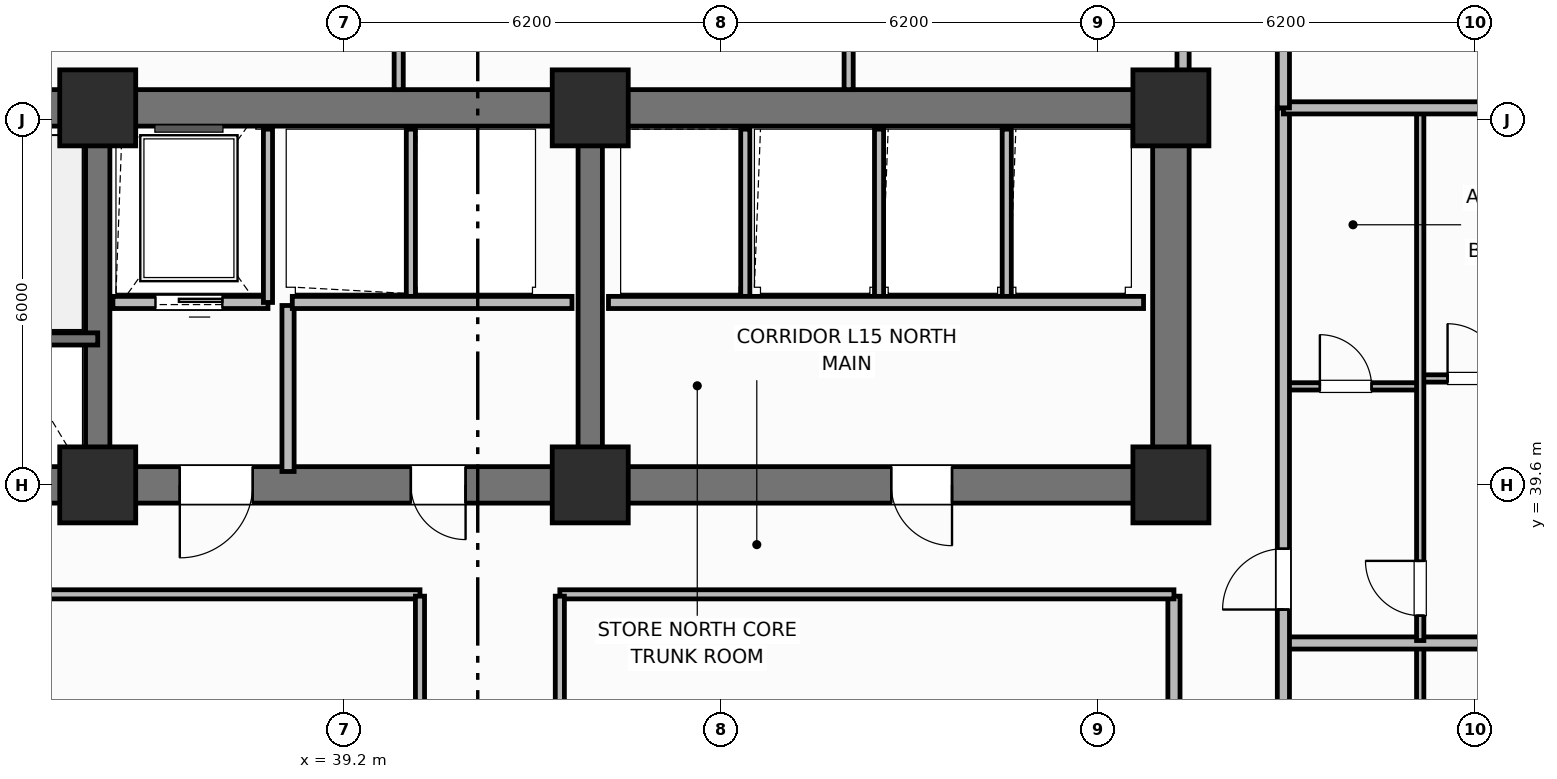
"""IFC4 building model, lengths in metres.
Left out: names, types, materials, properties, quantities, classifications, styles, units other than length and angle.
Written with IfcOpenShell. Run it as: python <this file> out.ifc"""

import sys

from ifc_helpers import new_model, si_unit, direction, frame, frame_2d, origin, origin_2d, place, context, subcontext, project, spatial, rectangle, extrude, element, fill, save


model = new_model("IFC4")
c1 = context("Model", 3, precision=1e-05, world=origin(), true_north=direction((0.0, 1.0)))
c2 = subcontext(c1, "Body", "Model", "MODEL_VIEW")
j1 = project(units=[si_unit("LENGTHUNIT", "METRE"), si_unit("PLANEANGLEUNIT", "RADIAN")], contexts=[c1])
p1 = place(None, origin())
s1 = spatial("IfcSite", under=j1, at=p1, CompositionType="ELEMENT")
p2 = place(p1, origin())
s2 = spatial("IfcBuilding", under=s1, at=p2, CompositionType="ELEMENT")
p3 = place(p2, frame((0.0, 0.0, 62.1)))
s3 = spatial("IfcBuildingStorey", under=s2, at=p3, CompositionType="ELEMENT", Elevation=62.1)
p4 = place(p3, frame((25.6, 45.8, 0.0), z_axis=(0.0, 0.0, 1.0), x_axis=(1.0, 0.0, 0.0)))
e1 = element("IfcWall", 1, at=p4, inside=s3, PredefinedType="SHEAR", context=c2, shape_type="SweptSolid", body=[
    extrude(rectangle(XDim=27.2, YDim=0.6, at=frame_2d((13.6, 0.0))), origin(), (0.0, 0.0, 1.0), 3.7),
])
p5 = place(p3, frame((52.8, 39.9, 0.0), z_axis=(0.0, 0.0, 1.0), x_axis=(0.0, 1.0, 0.0)))
e2 = element("IfcWall", 2, at=p5, inside=s3, PredefinedType="SHEAR", context=c2, shape_type="SweptSolid", body=[
    extrude(rectangle(XDim=5.6, YDim=0.6, at=frame_2d((2.8, 0.0))), origin(), (0.0, 0.0, 1.0), 3.7),
])
p6 = place(p3, frame((52.8, 39.6, 0.0), z_axis=(0.0, 0.0, 1.0), x_axis=(-1.0, 0.0, 0.0)))
e3 = element("IfcWall", 3, at=p6, inside=s3, PredefinedType="SHEAR", context=c2, shape_type="SweptSolid", body=[
    extrude(rectangle(XDim=27.2, YDim=0.6, at=frame_2d((13.6, 0.0))), origin(), (0.0, 0.0, 1.0), 3.7),
])
p7 = place(p6, frame((24.2, 0.0, 0.0)))
e4 = element("IfcOpeningElement", 4, at=p7, cuts=e3, PredefinedType="OPENING", context=c2, shape_type="SweptSolid", body=[
    extrude(rectangle(XDim=1.1, YDim=2.15, at=frame_2d((0.55, 1.075))), frame((0.0, 0.31, 0.0), z_axis=(0.0, -1.0, 0.0), x_axis=(1.0, 0.0, 0.0)), (0.0, 0.0, 1.0), 0.62),
])
p8 = place(p6, frame((15.1, 0.0, 0.0)))
e5 = element("IfcOpeningElement", 5, at=p8, cuts=e3, PredefinedType="OPENING", context=c2, shape_type="SweptSolid", body=[
    extrude(rectangle(XDim=1.2, YDim=2.15, at=frame_2d((0.6, 1.075))), frame((0.0, 0.31, 0.0), z_axis=(0.0, -1.0, 0.0), x_axis=(1.0, 0.0, 0.0)), (0.0, 0.0, 1.0), 0.62),
])
p9 = place(p6, frame((11.6, 0.0, 0.0)))
e6 = element("IfcOpeningElement", 6, at=p9, cuts=e3, PredefinedType="OPENING", context=c2, shape_type="SweptSolid", body=[
    extrude(rectangle(XDim=0.9, YDim=2.1, at=frame_2d((0.45, 1.05))), frame((0.0, 0.31, 0.0), z_axis=(0.0, -1.0, 0.0), x_axis=(1.0, 0.0, 0.0)), (0.0, 0.0, 1.0), 0.62),
])
p10 = place(p6, frame((3.6, 0.0, 0.0)))
e7 = element("IfcOpeningElement", 7, at=p10, cuts=e3, PredefinedType="OPENING", context=c2, shape_type="SweptSolid", body=[
    extrude(rectangle(XDim=1.0, YDim=2.15, at=frame_2d((0.5, 1.075))), frame((0.0, 0.31, 0.0), z_axis=(0.0, -1.0, 0.0), x_axis=(1.0, 0.0, 0.0)), (0.0, 0.0, 1.0), 0.62),
])
for number, where, z_axis, x_axis in (
    (8, (35.15, 39.9, 0.0), (0.0, 0.0, 1.0), (0.0, 1.0, 0.0)),
    (9, (43.25, 39.9, 0.0), (0.0, 0.0, 1.0), (0.0, 1.0, 0.0)),
):
    element("IfcWall", number, at=place(p3, frame(where, z_axis=z_axis, x_axis=x_axis)), inside=s3, PredefinedType="SHEAR", context=c2, shape_type="SweptSolid", body=[
        extrude(rectangle(XDim=5.6, YDim=0.4, at=frame_2d((2.8, 0.0))), origin(), (0.0, 0.0, 1.0), 3.7),
    ])
for number, where, z_axis, x_axis in (
    (10, (35.15, 39.6, 0.0), (0.0, 0.0, 1.0), (1.0, 0.0, 0.0)),
    (11, (35.15, 45.8, 0.0), (0.0, 0.0, 1.0), (1.0, 0.0, 0.0)),
    (12, (43.25, 39.6, 0.0), (0.0, 0.0, 1.0), (1.0, 0.0, 0.0)),
    (13, (43.25, 45.8, 0.0), (0.0, 0.0, 1.0), (1.0, 0.0, 0.0)),
    (14, (52.8, 39.6, 0.0), (0.0, 0.0, 1.0), (1.0, 0.0, 0.0)),
    (15, (52.8, 45.8, 0.0), (0.0, 0.0, 1.0), (1.0, 0.0, 0.0)),
):
    element("IfcColumn", number, at=place(p3, frame(where, z_axis=z_axis, x_axis=x_axis)), inside=s3, PredefinedType="COLUMN", context=c2, shape_type="SweptSolid", body=[
        extrude(rectangle(XDim=1.25, YDim=1.25, at=origin_2d()), origin(), (0.0, 0.0, 1.0), 3.7),
    ])
p11 = place(p3, frame((35.15, 42.0, 0.0), z_axis=(0.0, 0.0, 1.0), x_axis=(-1.0, 0.0, 0.0)))
e16 = element("IfcWall", 16, at=p11, inside=s3, PredefinedType="SHEAR", context=c2, shape_type="SweptSolid", body=[
    extrude(rectangle(XDim=9.55, YDim=0.2, at=frame_2d((4.775, 0.0))), origin(), (0.0, 0.0, 1.0), 3.7),
])
p12 = place(p11, frame((7.25, 0.0, 0.0)))
e17 = element("IfcOpeningElement", 17, at=p12, cuts=e16, PredefinedType="OPENING", context=c2, shape_type="SweptSolid", body=[
    extrude(rectangle(XDim=1.1, YDim=2.15, at=frame_2d((0.55, 1.075))), frame((0.0, 0.11, 0.0), z_axis=(0.0, -1.0, 0.0), x_axis=(1.0, 0.0, 0.0)), (0.0, 0.0, 1.0), 0.22),
])
p13 = place(p3, frame((37.95, 42.6, 0.0), z_axis=(0.0, 0.0, 1.0), x_axis=(-1.0, 0.0, 0.0)))
e18 = element("IfcWall", 18, at=p13, inside=s3, PredefinedType="PARTITIONING", context=c2, shape_type="SweptSolid", body=[
    extrude(rectangle(XDim=2.55, YDim=0.2, at=frame_2d((1.275, 0.0))), origin(), (0.0, 0.0, 1.0), 2.3),
])
p14 = place(p13, frame((0.75, 0.0, 0.0)))
e19 = element("IfcOpeningElement", 19, at=p14, cuts=e18, PredefinedType="OPENING", context=c2, shape_type="SweptSolid", body=[
    extrude(rectangle(XDim=1.1, YDim=2.15, at=frame_2d((0.55, 1.075))), frame((0.0, 0.11, 0.0), z_axis=(0.0, -1.0, 0.0), x_axis=(1.0, 0.0, 0.0)), (0.0, 0.0, 1.0), 0.22),
])
p15 = place(p3, frame((37.95, 42.6, 0.0), z_axis=(0.0, 0.0, 1.0), x_axis=(0.0, 1.0, 0.0)))
e20 = element("IfcWall", 20, at=p15, inside=s3, PredefinedType="PARTITIONING", context=c2, shape_type="SweptSolid", body=[
    extrude(rectangle(XDim=2.85, YDim=0.15, at=frame_2d((1.425, 0.0))), origin(), (0.0, 0.0, 1.0), 2.53),
])
p16 = place(p3, frame((38.28, 39.82, 0.0), z_axis=(0.0, 0.0, 1.0), x_axis=(0.0, 1.0, 0.0)))
e21 = element("IfcWall", 21, at=p16, inside=s3, PredefinedType="PARTITIONING", context=c2, shape_type="SweptSolid", body=[
    extrude(rectangle(XDim=2.73, YDim=0.2, at=frame_2d((1.365, 0.0))), origin(), (0.0, 0.0, 1.0), 2.53),
])
p17 = place(p3, frame((40.3, 42.65, 0.0), z_axis=(0.0, 0.0, 1.0), x_axis=(0.0, 1.0, 0.0)))
e22 = element("IfcWall", 22, at=p17, inside=s3, PredefinedType="PARTITIONING", context=c2, shape_type="SweptSolid", body=[
    extrude(rectangle(XDim=2.8, YDim=0.15, at=frame_2d((1.4, 0.0))), origin(), (0.0, 0.0, 1.0), 2.53),
])
p18 = place(p3, frame((42.95, 42.6, 0.0), z_axis=(0.0, 0.0, 1.0), x_axis=(-1.0, 0.0, 0.0)))
e23 = element("IfcWall", 23, at=p18, inside=s3, PredefinedType="PARTITIONING", context=c2, shape_type="SweptSolid", body=[
    extrude(rectangle(XDim=4.6, YDim=0.2, at=frame_2d((2.3, 0.0))), origin(), (0.0, 0.0, 1.0), 2.3),
])
for number, where, z_axis, x_axis in (
    (24, (45.8, 42.65, 0.0), (0.0, 0.0, 1.0), (0.0, 1.0, 0.0)),
    (25, (48.0, 42.65, 0.0), (0.0, 0.0, 1.0), (0.0, 1.0, 0.0)),
    (26, (50.1, 42.65, 0.0), (0.0, 0.0, 1.0), (0.0, 1.0, 0.0)),
):
    element("IfcWall", number, at=place(p3, frame(where, z_axis=z_axis, x_axis=x_axis)), inside=s3, PredefinedType="PARTITIONING", context=c2, shape_type="SweptSolid", body=[
        extrude(rectangle(XDim=2.8, YDim=0.15, at=frame_2d((1.4, 0.0))), origin(), (0.0, 0.0, 1.0), 2.53),
    ])
p19 = place(p3, frame((52.35, 42.6, 0.0), z_axis=(0.0, 0.0, 1.0), x_axis=(-1.0, 0.0, 0.0)))
e27 = element("IfcWall", 27, at=p19, inside=s3, PredefinedType="PARTITIONING", context=c2, shape_type="SweptSolid", body=[
    extrude(rectangle(XDim=8.8, YDim=0.2, at=frame_2d((4.4, 0.0))), origin(), (0.0, 0.0, 1.0), 2.53),
])
p20 = place(p3, frame((52.85, 18.63, 0.0), z_axis=(0.0, 0.0, 1.0), x_axis=(0.0, 1.0, 0.0)))
e28 = element("IfcWall", 28, at=p20, inside=s3, PredefinedType="PARTITIONING", context=c2, shape_type="SweptSolid", body=[
    extrude(rectangle(XDim=19.14, YDim=0.2, at=frame_2d((9.57, 0.0))), origin(), (0.0, 0.0, 1.0), 2.53),
])
p21 = place(p3, frame((25.55, 37.8, 0.0), z_axis=(0.0, 0.0, 1.0), x_axis=(1.0, 0.0, 0.0)))
e29 = element("IfcWall", 29, at=p21, inside=s3, PredefinedType="PARTITIONING", context=c2, shape_type="SweptSolid", body=[
    extrude(rectangle(XDim=14.9, YDim=0.15, at=frame_2d((7.45, 0.0))), origin(), (0.0, 0.0, 1.0), 2.53),
])
p22 = place(p3, frame((42.75, 37.8, 0.0), z_axis=(0.0, 0.0, 1.0), x_axis=(1.0, 0.0, 0.0)))
e30 = element("IfcWall", 30, at=p22, inside=s3, PredefinedType="PARTITIONING", context=c2, shape_type="SweptSolid", body=[
    extrude(rectangle(XDim=10.1, YDim=0.15, at=frame_2d((5.05, 0.0))), origin(), (0.0, 0.0, 1.0), 2.53),
])
p23 = place(p3, frame((40.45, 18.63, 0.0), z_axis=(0.0, 0.0, 1.0), x_axis=(0.0, 1.0, 0.0)))
e31 = element("IfcWall", 31, at=p23, inside=s3, PredefinedType="PARTITIONING", context=c2, shape_type="SweptSolid", body=[
    extrude(rectangle(XDim=19.14, YDim=0.15, at=frame_2d((9.57, 0.0))), origin(), (0.0, 0.0, 1.0), 2.53),
])
p24 = place(p23, frame((2.4, 0.0, 0.0)))
e32 = element("IfcOpeningElement", 32, at=p24, cuts=e31, PredefinedType="OPENING", context=c2, shape_type="SweptSolid", body=[
    extrude(rectangle(XDim=1.0, YDim=2.15, at=frame_2d((0.5, 1.075))), frame((0.0, 0.085, 0.0), z_axis=(0.0, -1.0, 0.0), x_axis=(1.0, 0.0, 0.0)), (0.0, 0.0, 1.0), 0.17),
])
p25 = place(p23, frame((11.4, 0.0, 0.0)))
e33 = element("IfcOpeningElement", 33, at=p25, cuts=e31, PredefinedType="OPENING", context=c2, shape_type="SweptSolid", body=[
    extrude(rectangle(XDim=1.0, YDim=2.15, at=frame_2d((0.5, 1.075))), frame((0.0, 0.085, 0.0), z_axis=(0.0, -1.0, 0.0), x_axis=(1.0, 0.0, 0.0)), (0.0, 0.0, 1.0), 0.17),
])
p26 = place(p3, frame((42.75, 18.63, 0.0), z_axis=(0.0, 0.0, 1.0), x_axis=(0.0, 1.0, 0.0)))
e34 = element("IfcWall", 34, at=p26, inside=s3, PredefinedType="PARTITIONING", context=c2, shape_type="SweptSolid", body=[
    extrude(rectangle(XDim=19.14, YDim=0.15, at=frame_2d((9.57, 0.0))), origin(), (0.0, 0.0, 1.0), 2.53),
])
p27 = place(p26, frame((5.5, 0.0, 0.0)))
e35 = element("IfcOpeningElement", 35, at=p27, cuts=e34, PredefinedType="OPENING", context=c2, shape_type="SweptSolid", body=[
    extrude(rectangle(XDim=1.0, YDim=2.15, at=frame_2d((0.5, 1.075))), frame((0.0, 0.085, 0.0), z_axis=(0.0, -1.0, 0.0), x_axis=(1.0, 0.0, 0.0)), (0.0, 0.0, 1.0), 0.17),
])
p28 = place(p3, frame((56.9, 26.64, 0.0), z_axis=(0.0, 0.0, 1.0), x_axis=(0.0, 1.0, 0.0)))
e36 = element("IfcWall", 36, at=p28, inside=s3, PredefinedType="PARTITIONING", context=c2, shape_type="SweptSolid", body=[
    extrude(rectangle(XDim=10.32, YDim=0.12, at=frame_2d((5.16, 0.0))), origin(), (0.0, 0.0, 1.0), 2.53),
])
p29 = place(p28, frame((0.56, 0.0, 0.0)))
e37 = element("IfcOpeningElement", 37, at=p29, cuts=e36, PredefinedType="OPENING", context=c2, shape_type="SweptSolid", body=[
    extrude(rectangle(XDim=0.9, YDim=2.1, at=frame_2d((0.45, 1.05))), frame((0.0, 0.07, 0.0), z_axis=(0.0, -1.0, 0.0), x_axis=(1.0, 0.0, 0.0)), (0.0, 0.0, 1.0), 0.14),
])
p30 = place(p3, frame((54.65, 37.0, 0.0), z_axis=(0.0, 0.0, 1.0), x_axis=(1.0, 0.0, 0.0)))
e38 = element("IfcWall", 38, at=p30, inside=s3, PredefinedType="PARTITIONING", context=c2, shape_type="SweptSolid", body=[
    extrude(rectangle(XDim=9.18, YDim=0.2, at=frame_2d((4.59, 0.0))), origin(), (0.0, 0.0, 1.0), 2.53),
])
p31 = place(p3, frame((54.65, 41.22, 0.0), z_axis=(0.0, 0.0, 1.0), x_axis=(1.0, 0.0, 0.0)))
e39 = element("IfcWall", 39, at=p31, inside=s3, PredefinedType="PARTITIONING", context=c2, shape_type="SweptSolid", body=[
    extrude(rectangle(XDim=2.25, YDim=0.12, at=frame_2d((1.125, 0.0))), origin(), (0.0, 0.0, 1.0), 2.53),
])
p32 = place(p31, frame((0.6, 0.0, 0.0)))
e40 = element("IfcOpeningElement", 40, at=p32, cuts=e39, PredefinedType="OPENING", context=c2, shape_type="SweptSolid", body=[
    extrude(rectangle(XDim=0.85, YDim=2.1, at=frame_2d((0.425, 1.05))), frame((0.0, 0.07, 0.0), z_axis=(0.0, -1.0, 0.0), x_axis=(1.0, 0.0, 0.0)), (0.0, 0.0, 1.0), 0.14),
])
p33 = place(p3, frame((56.9, 41.35, 0.0), z_axis=(0.0, 0.0, 1.0), x_axis=(1.0, 0.0, 0.0)))
e41 = element("IfcWall", 41, at=p33, inside=s3, PredefinedType="PARTITIONING", context=c2, shape_type="SweptSolid", body=[
    extrude(rectangle(XDim=6.93, YDim=0.12, at=frame_2d((3.465, 0.0))), origin(), (0.0, 0.0, 1.0), 2.53),
])
p34 = place(p33, frame((0.45, 0.0, 0.0)))
e42 = element("IfcOpeningElement", 42, at=p34, cuts=e41, PredefinedType="OPENING", context=c2, shape_type="SweptSolid", body=[
    extrude(rectangle(XDim=0.9, YDim=2.1, at=frame_2d((0.45, 1.05))), frame((0.0, 0.07, 0.0), z_axis=(0.0, -1.0, 0.0), x_axis=(1.0, 0.0, 0.0)), (0.0, 0.0, 1.0), 0.14),
])
p35 = place(p3, frame((56.9, 37.04, 0.0), z_axis=(0.0, 0.0, 1.0), x_axis=(0.0, 1.0, 0.0)))
e43 = element("IfcWall", 43, at=p35, inside=s3, PredefinedType="PARTITIONING", context=c2, shape_type="SweptSolid", body=[
    extrude(rectangle(XDim=8.72, YDim=0.12, at=frame_2d((4.36, 0.0))), origin(), (0.0, 0.0, 1.0), 2.53),
])
p36 = place(p35, frame((0.41, 0.0, 0.0)))
e44 = element("IfcOpeningElement", 44, at=p36, cuts=e43, PredefinedType="OPENING", context=c2, shape_type="SweptSolid", body=[
    extrude(rectangle(XDim=0.9, YDim=2.1, at=frame_2d((0.45, 1.05))), frame((0.0, 0.07, 0.0), z_axis=(0.0, -1.0, 0.0), x_axis=(1.0, 0.0, 0.0)), (0.0, 0.0, 1.0), 0.14),
])
p37 = place(p3, frame((54.65, 10.6, 0.0), z_axis=(0.0, 0.0, 1.0), x_axis=(0.0, 1.0, 0.0)))
e45 = element("IfcWall", 45, at=p37, inside=s3, PredefinedType="PARTITIONING", context=c2, shape_type="SweptSolid", body=[
    extrude(rectangle(XDim=35.2, YDim=0.2, at=frame_2d((17.6, 0.0))), origin(), (0.0, 0.0, 1.0), 2.53),
])
p38 = place(p37, frame((2.65, 0.0, 0.0)))
e46 = element("IfcOpeningElement", 46, at=p38, cuts=e45, PredefinedType="OPENING", context=c2, shape_type="SweptSolid", body=[
    extrude(rectangle(XDim=1.0, YDim=2.15, at=frame_2d((0.5, 1.075))), frame((0.0, 0.11, 0.0), z_axis=(0.0, -1.0, 0.0), x_axis=(1.0, 0.0, 0.0)), (0.0, 0.0, 1.0), 0.22),
])
p39 = place(p37, frame((10.81, 0.0, 0.0)))
e47 = element("IfcOpeningElement", 47, at=p39, cuts=e45, PredefinedType="OPENING", context=c2, shape_type="SweptSolid", body=[
    extrude(rectangle(XDim=1.0, YDim=2.15, at=frame_2d((0.5, 1.075))), frame((0.0, 0.11, 0.0), z_axis=(0.0, -1.0, 0.0), x_axis=(1.0, 0.0, 0.0)), (0.0, 0.0, 1.0), 0.22),
])
p40 = place(p37, frame((19.54, 0.0, 0.0)))
e48 = element("IfcOpeningElement", 48, at=p40, cuts=e45, PredefinedType="OPENING", context=c2, shape_type="SweptSolid", body=[
    extrude(rectangle(XDim=1.0, YDim=2.15, at=frame_2d((0.5, 1.075))), frame((0.0, 0.11, 0.0), z_axis=(0.0, -1.0, 0.0), x_axis=(1.0, 0.0, 0.0)), (0.0, 0.0, 1.0), 0.22),
])
p41 = place(p37, frame((26.95, 0.0, 0.0)))
e49 = element("IfcOpeningElement", 49, at=p41, cuts=e45, PredefinedType="OPENING", context=c2, shape_type="SweptSolid", body=[
    extrude(rectangle(XDim=1.0, YDim=2.15, at=frame_2d((0.5, 1.075))), frame((0.0, 0.11, 0.0), z_axis=(0.0, -1.0, 0.0), x_axis=(1.0, 0.0, 0.0)), (0.0, 0.0, 1.0), 0.22),
])
p42 = place(p3, frame((54.65, 45.8, 0.0), z_axis=(0.0, 0.0, 1.0), x_axis=(1.0, 0.0, 0.0)))
e50 = element("IfcWall", 50, at=p42, inside=s3, PredefinedType="PARTITIONING", context=c2, shape_type="SweptSolid", body=[
    extrude(rectangle(XDim=8.76, YDim=0.2, at=frame_2d((4.38, 0.0))), origin(), (0.0, 0.0, 1.0), 2.53),
])
p43 = place(p3, frame((54.65, 45.8, 0.0), z_axis=(0.0, 0.0, 1.0), x_axis=(0.0, 1.0, 0.0)))
e51 = element("IfcWall", 51, at=p43, inside=s3, PredefinedType="PARTITIONING", context=c2, shape_type="SweptSolid", body=[
    extrude(rectangle(XDim=5.63, YDim=0.2, at=frame_2d((2.815, 0.0))), origin(), (0.0, 0.0, 1.0), 2.53),
])
p44 = place(p3, frame((40.1, 46.1, 0.0), z_axis=(0.0, 0.0, 1.0), x_axis=(0.0, 1.0, 0.0)))
e52 = element("IfcWall", 52, at=p44, inside=s3, PredefinedType="PARTITIONING", context=c2, shape_type="SweptSolid", body=[
    extrude(rectangle(XDim=5.33, YDim=0.15, at=frame_2d((2.665, 0.0))), origin(), (0.0, 0.0, 1.0), 2.53),
])
p45 = place(p3, frame((47.5, 46.1, 0.0), z_axis=(0.0, 0.0, 1.0), x_axis=(0.0, 1.0, 0.0)))
e53 = element("IfcWall", 53, at=p45, inside=s3, PredefinedType="PARTITIONING", context=c2, shape_type="SweptSolid", body=[
    extrude(rectangle(XDim=5.33, YDim=0.15, at=frame_2d((2.665, 0.0))), origin(), (0.0, 0.0, 1.0), 2.53),
])
p46 = place(p45, frame((0.85, 0.0, 0.0)))
e54 = element("IfcOpeningElement", 54, at=p46, cuts=e53, PredefinedType="OPENING", context=c2, shape_type="SweptSolid", body=[
    extrude(rectangle(XDim=0.9, YDim=2.1, at=frame_2d((0.45, 1.05))), frame((0.0, 0.085, 0.0), z_axis=(0.0, -1.0, 0.0), x_axis=(1.0, 0.0, 0.0)), (0.0, 0.0, 1.0), 0.17),
])
p47 = place(p3, frame((53.0, 46.1, 0.0), z_axis=(0.0, 0.0, 1.0), x_axis=(0.0, 1.0, 0.0)))
e55 = element("IfcWall", 55, at=p47, inside=s3, PredefinedType="PARTITIONING", context=c2, shape_type="SweptSolid", body=[
    extrude(rectangle(XDim=4.58, YDim=0.2, at=frame_2d((2.29, 0.0))), origin(), (0.0, 0.0, 1.0), 2.53),
])
p48 = place(p47, frame((1.05, 0.0, 0.0)))
e56 = element("IfcOpeningElement", 56, at=p48, cuts=e55, PredefinedType="OPENING", context=c2, shape_type="SweptSolid", body=[
    extrude(rectangle(XDim=0.9, YDim=2.1, at=frame_2d((0.45, 1.05))), frame((0.0, 0.11, 0.0), z_axis=(0.0, -1.0, 0.0), x_axis=(1.0, 0.0, 0.0)), (0.0, 0.0, 1.0), 0.22),
])
p49 = place(p14, origin())
e57 = element("IfcDoor", 57, at=p49, inside=s3, OperationType="SLIDING_TO_LEFT", PredefinedType="DOOR", context=c2, shape_type="SweptSolid", body=[
    extrude(rectangle(XDim=1.1, YDim=2.15, at=frame_2d((0.55, 1.075))), frame((0.0, 0.025, 0.0), z_axis=(0.0, -1.0, 0.0), x_axis=(1.0, 0.0, 0.0)), (0.0, 0.0, 1.0), 0.05),
])
fill(e19, e57)
p50 = place(p32, origin())
e58 = element("IfcDoor", 58, at=p50, inside=s3, OperationType="SINGLE_SWING_LEFT", PredefinedType="DOOR", context=c2, shape_type="SweptSolid", body=[
    extrude(rectangle(XDim=0.85, YDim=2.1, at=frame_2d((0.425, 1.05))), frame((0.0, 0.025, 0.0), z_axis=(0.0, -1.0, 0.0), x_axis=(1.0, 0.0, 0.0)), (0.0, 0.0, 1.0), 0.05),
])
fill(e40, e58)
p51 = place(p34, origin())
e59 = element("IfcDoor", 59, at=p51, inside=s3, OperationType="SINGLE_SWING_LEFT", PredefinedType="DOOR", context=c2, shape_type="SweptSolid", body=[
    extrude(rectangle(XDim=0.9, YDim=2.1, at=frame_2d((0.45, 1.05))), frame((0.0, 0.025, 0.0), z_axis=(0.0, -1.0, 0.0), x_axis=(1.0, 0.0, 0.0)), (0.0, 0.0, 1.0), 0.05),
])
fill(e42, e59)
p52 = place(p36, origin())
e60 = element("IfcDoor", 60, at=p52, inside=s3, OperationType="SINGLE_SWING_RIGHT", PredefinedType="DOOR", context=c2, shape_type="SweptSolid", body=[
    extrude(rectangle(XDim=0.9, YDim=2.1, at=frame_2d((0.45, 1.05))), frame((0.0, 0.025, 0.0), z_axis=(0.0, -1.0, 0.0), x_axis=(1.0, 0.0, 0.0)), (0.0, 0.0, 1.0), 0.05),
])
fill(e44, e60)
p53 = place(p41, origin())
e61 = element("IfcDoor", 61, at=p53, inside=s3, OperationType="SINGLE_SWING_LEFT", PredefinedType="DOOR", context=c2, shape_type="SweptSolid", body=[
    extrude(rectangle(XDim=1.0, YDim=2.15, at=frame_2d((0.5, 1.075))), frame((0.0, 0.025, 0.0), z_axis=(0.0, -1.0, 0.0), x_axis=(1.0, 0.0, 0.0)), (0.0, 0.0, 1.0), 0.05),
])
fill(e49, e61)
p54 = place(p8, origin())
e62 = element("IfcDoor", 62, at=p54, inside=s3, OperationType="SINGLE_SWING_RIGHT", PredefinedType="DOOR", context=c2, shape_type="SweptSolid", body=[
    extrude(rectangle(XDim=1.2, YDim=2.15, at=frame_2d((0.6, 1.075))), frame((0.0, 0.025, 0.0), z_axis=(0.0, -1.0, 0.0), x_axis=(1.0, 0.0, 0.0)), (0.0, 0.0, 1.0), 0.05),
])
fill(e5, e62)
p55 = place(p9, origin())
e63 = element("IfcDoor", 63, at=p55, inside=s3, OperationType="SINGLE_SWING_LEFT", PredefinedType="DOOR", context=c2, shape_type="SweptSolid", body=[
    extrude(rectangle(XDim=0.9, YDim=2.1, at=frame_2d((0.45, 1.05))), frame((0.0, 0.025, 0.0), z_axis=(0.0, -1.0, 0.0), x_axis=(1.0, 0.0, 0.0)), (0.0, 0.0, 1.0), 0.05),
])
fill(e6, e63)
p56 = place(p10, origin())
e64 = element("IfcDoor", 64, at=p56, inside=s3, OperationType="SINGLE_SWING_LEFT", PredefinedType="DOOR", context=c2, shape_type="SweptSolid", body=[
    extrude(rectangle(XDim=1.0, YDim=2.15, at=frame_2d((0.5, 1.075))), frame((0.0, 0.025, 0.0), z_axis=(0.0, -1.0, 0.0), x_axis=(1.0, 0.0, 0.0)), (0.0, 0.0, 1.0), 0.05),
])
fill(e7, e64)
save(model, sys.argv[1])
